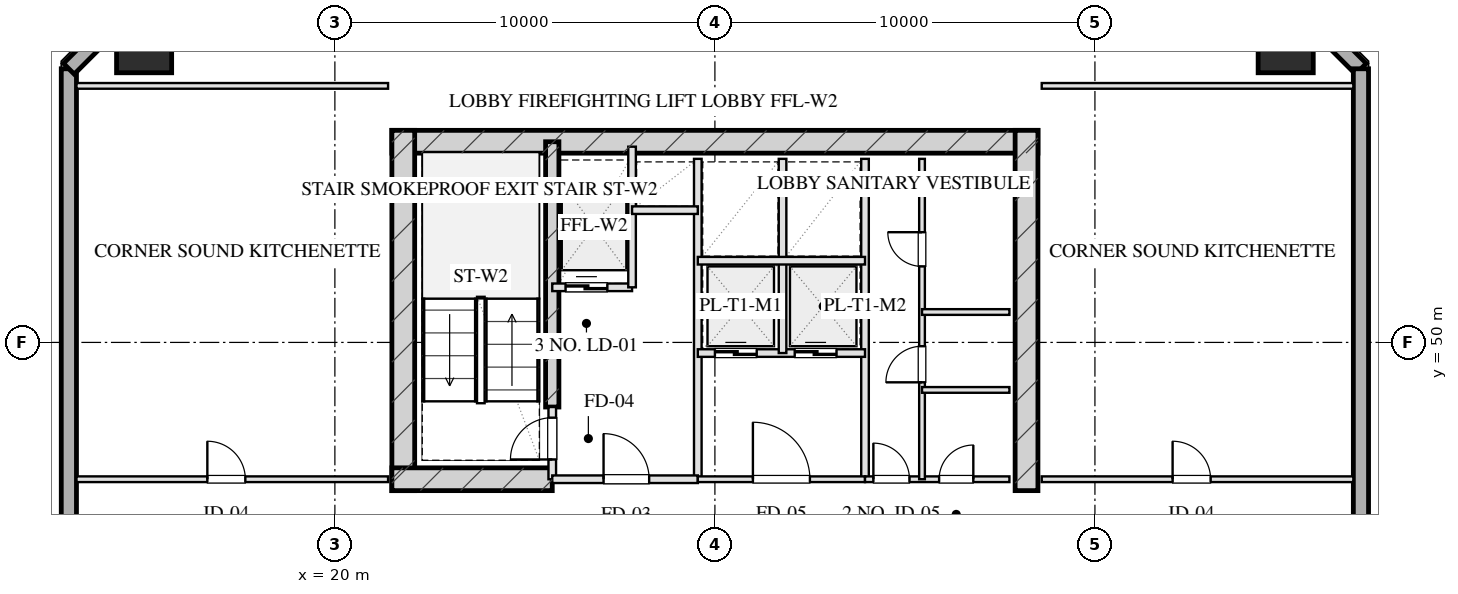
"""IFC4 building model, lengths in metres.
Left out: names, types, materials, properties, quantities, classifications, styles, units other than length and angle.
Written with IfcOpenShell. Run it as: python <this file> out.ifc"""

import sys

from ifc_helpers import new_model, si_unit, direction, frame, frame_2d, origin, origin_2d, place, context, subcontext, project, spatial, rectangle, hollow_rectangle, extrude, element, fill, save


model = new_model("IFC4")
c1 = context("Model", 3, precision=1e-05, world=origin(), true_north=direction((0.0, 1.0)))
c2 = subcontext(c1, "Body", "Model", "MODEL_VIEW")
j1 = project(units=[si_unit("LENGTHUNIT", "METRE"), si_unit("PLANEANGLEUNIT", "RADIAN")], contexts=[c1])
p1 = place(None, origin())
s1 = spatial("IfcSite", under=j1, at=p1, CompositionType="ELEMENT")
p2 = place(p1, origin())
s2 = spatial("IfcBuilding", under=s1, at=p2, CompositionType="ELEMENT")
p3 = place(p2, frame((0.0, 0.0, 180.55)))
s3 = spatial("IfcBuildingStorey", under=s2, at=p3, CompositionType="ELEMENT", Elevation=180.55)
p4 = place(p3, frame((21.5, 55.28, 0.0), z_axis=(0.0, 0.0, 1.0), x_axis=(1.0, 0.0, 0.0)))
e1 = element("IfcWall", 1, at=p4, inside=s3, PredefinedType="SHEAR", context=c2, shape_type="SweptSolid", body=[
    extrude(rectangle(XDim=17.0, YDim=0.6, at=frame_2d((8.5, 0.0))), origin(), (0.0, 0.0, 1.0), 3.45),
])
for number, where, z_axis, x_axis in (
    (2, (21.8, 46.1, 0.0), (0.0, 0.0, 1.0), (0.0, 1.0, 0.0)),
    (3, (38.2, 46.1, 0.0), (0.0, 0.0, 1.0), (0.0, 1.0, 0.0)),
):
    element("IfcWall", number, at=place(p3, frame(where, z_axis=z_axis, x_axis=x_axis)), inside=s3, PredefinedType="SHEAR", context=c2, shape_type="SweptSolid", body=[
        extrude(rectangle(XDim=9.48, YDim=0.6, at=frame_2d((4.74, 0.0))), origin(), (0.0, 0.0, 1.0), 3.45),
    ])
p5 = place(p3, frame((25.72, 48.3, 0.0), z_axis=(0.0, 0.0, 1.0), x_axis=(0.0, 1.0, 0.0)))
e4 = element("IfcWall", 4, at=p5, inside=s3, PredefinedType="SHEAR", context=c2, shape_type="SweptSolid", body=[
    extrude(rectangle(XDim=6.98, YDim=0.35, at=frame_2d((3.49, 0.0))), origin(), (0.0, 0.0, 1.0), 3.45),
])
p6 = place(p3, frame((21.5, 46.4, 0.0), z_axis=(0.0, 0.0, 1.0), x_axis=(1.0, 0.0, 0.0)))
e5 = element("IfcWall", 5, at=p6, inside=s3, PredefinedType="SHEAR", context=c2, shape_type="SweptSolid", body=[
    extrude(rectangle(XDim=4.22, YDim=0.6, at=frame_2d((2.11, 0.0))), origin(), (0.0, 0.0, 1.0), 3.45),
])
for number, where, z_axis, x_axis in (
    (6, (45.02, 57.82, 0.0), (0.0, 0.0, 1.0), (1.0, 0.0, 0.0)),
    (7, (14.98, 57.82, 0.0), (0.0, 0.0, 1.0), (1.0, 0.0, 0.0)),
):
    element("IfcColumn", number, at=place(p3, frame(where, z_axis=z_axis, x_axis=x_axis)), inside=s3, PredefinedType="COLUMN", context=c2, shape_type="SweptSolid", body=[
        extrude(hollow_rectangle(XDim=1.45, YDim=1.45, WallThickness=0.05, at=origin_2d()), origin(), (0.0, 0.0, 1.0), 3.451),
    ])
p7 = place(p3, frame((13.0, 10.8, 0.0), z_axis=(0.0, 0.0, 1.0), x_axis=(0.0, 1.0, 0.0)))
e8 = element("IfcWall", 8, at=p7, inside=s3, PredefinedType="SOLIDWALL", context=c2, shape_type="SweptSolid", body=[
    extrude(rectangle(XDim=46.4, YDim=0.4, at=frame_2d((23.2, 0.0))), origin(), (0.0, 0.0, 1.0), 2.55),
])
p8 = place(p7, frame((15.75, 0.0, 0.75)))
e9 = element("IfcOpeningElement", 9, at=p8, cuts=e8, PredefinedType="OPENING", context=c2, shape_type="SweptSolid", body=[
    extrude(rectangle(XDim=2.1, YDim=1.4, at=frame_2d((1.05, 0.7))), frame((0.0, 0.21, 0.0), z_axis=(0.0, -1.0, 0.0), x_axis=(1.0, 0.0, 0.0)), (0.0, 0.0, 1.0), 0.42),
])
p9 = place(p7, frame((19.55, 0.0, 0.75)))
e10 = element("IfcOpeningElement", 10, at=p9, cuts=e8, PredefinedType="OPENING", context=c2, shape_type="SweptSolid", body=[
    extrude(rectangle(XDim=2.1, YDim=1.4, at=frame_2d((1.05, 0.7))), frame((0.0, 0.21, 0.0), z_axis=(0.0, -1.0, 0.0), x_axis=(1.0, 0.0, 0.0)), (0.0, 0.0, 1.0), 0.42),
])
p10 = place(p7, frame((24.75, 0.0, 0.75)))
e11 = element("IfcOpeningElement", 11, at=p10, cuts=e8, PredefinedType="OPENING", context=c2, shape_type="SweptSolid", body=[
    extrude(rectangle(XDim=2.1, YDim=1.4, at=frame_2d((1.05, 0.7))), frame((0.0, 0.21, 0.0), z_axis=(0.0, -1.0, 0.0), x_axis=(1.0, 0.0, 0.0)), (0.0, 0.0, 1.0), 0.42),
])
p11 = place(p7, frame((28.55, 0.0, 0.75)))
e12 = element("IfcOpeningElement", 12, at=p11, cuts=e8, PredefinedType="OPENING", context=c2, shape_type="SweptSolid", body=[
    extrude(rectangle(XDim=2.1, YDim=1.4, at=frame_2d((1.05, 0.7))), frame((0.0, 0.21, 0.0), z_axis=(0.0, -1.0, 0.0), x_axis=(1.0, 0.0, 0.0)), (0.0, 0.0, 1.0), 0.42),
])
for number, where, z_axis, x_axis in (
    (13, (13.0, 57.2, 0.0), (0.0, 0.0, 1.0), (0.707, 0.707, 0.0)),
    (14, (44.4, 59.8, 0.0), (0.0, 0.0, 1.0), (0.707, -0.707, 0.0)),
):
    element("IfcWall", number, at=place(p3, frame(where, z_axis=z_axis, x_axis=x_axis)), inside=s3, PredefinedType="SOLIDWALL", context=c2, shape_type="SweptSolid", body=[
        extrude(rectangle(XDim=3.677, YDim=0.4, at=frame_2d((1.838, 0.0))), origin(), (0.0, 0.0, 1.0), 2.55),
    ])
p12 = place(p3, frame((47.0, 57.2, 0.0), z_axis=(0.0, 0.0, 1.0), x_axis=(0.0, -1.0, 0.0)))
e15 = element("IfcWall", 15, at=p12, inside=s3, PredefinedType="SOLIDWALL", context=c2, shape_type="SweptSolid", body=[
    extrude(rectangle(XDim=46.4, YDim=0.4, at=frame_2d((23.2, 0.0))), origin(), (0.0, 0.0, 1.0), 2.55),
])
p13 = place(p12, frame((28.55, 0.0, 0.75)))
e16 = element("IfcOpeningElement", 16, at=p13, cuts=e15, PredefinedType="OPENING", context=c2, shape_type="SweptSolid", body=[
    extrude(rectangle(XDim=2.1, YDim=1.4, at=frame_2d((1.05, 0.7))), frame((0.0, 0.21, 0.0), z_axis=(0.0, -1.0, 0.0), x_axis=(1.0, 0.0, 0.0)), (0.0, 0.0, 1.0), 0.42),
])
p14 = place(p12, frame((24.75, 0.0, 0.75)))
e17 = element("IfcOpeningElement", 17, at=p14, cuts=e15, PredefinedType="OPENING", context=c2, shape_type="SweptSolid", body=[
    extrude(rectangle(XDim=2.1, YDim=1.4, at=frame_2d((1.05, 0.7))), frame((0.0, 0.21, 0.0), z_axis=(0.0, -1.0, 0.0), x_axis=(1.0, 0.0, 0.0)), (0.0, 0.0, 1.0), 0.42),
])
p15 = place(p12, frame((19.55, 0.0, 0.75)))
e18 = element("IfcOpeningElement", 18, at=p15, cuts=e15, PredefinedType="OPENING", context=c2, shape_type="SweptSolid", body=[
    extrude(rectangle(XDim=2.1, YDim=1.4, at=frame_2d((1.05, 0.7))), frame((0.0, 0.21, 0.0), z_axis=(0.0, -1.0, 0.0), x_axis=(1.0, 0.0, 0.0)), (0.0, 0.0, 1.0), 0.42),
])
p16 = place(p12, frame((15.75, 0.0, 0.75)))
e19 = element("IfcOpeningElement", 19, at=p16, cuts=e15, PredefinedType="OPENING", context=c2, shape_type="SweptSolid", body=[
    extrude(rectangle(XDim=2.1, YDim=1.4, at=frame_2d((1.05, 0.7))), frame((0.0, 0.21, 0.0), z_axis=(0.0, -1.0, 0.0), x_axis=(1.0, 0.0, 0.0)), (0.0, 0.0, 1.0), 0.42),
])
p17 = place(p3, frame((25.72, 46.4, 0.0), z_axis=(0.0, 0.0, 1.0), x_axis=(0.0, 1.0, 0.0)))
e20 = element("IfcWall", 20, at=p17, inside=s3, PredefinedType="PARTITIONING", context=c2, shape_type="SweptSolid", body=[
    extrude(rectangle(XDim=1.9, YDim=0.2, at=frame_2d((0.95, 0.0))), origin(), (0.0, 0.0, 1.0), 3.155),
])
p18 = place(p17, frame((0.52, 0.0, 0.0)))
e21 = element("IfcOpeningElement", 21, at=p18, cuts=e20, PredefinedType="OPENING", context=c2, shape_type="SweptSolid", body=[
    extrude(rectangle(XDim=1.1, YDim=2.05, at=frame_2d((0.55, 1.025))), frame((0.0, 0.11, 0.0), z_axis=(0.0, -1.0, 0.0), x_axis=(1.0, 0.0, 0.0)), (0.0, 0.0, 1.0), 0.22),
])
p19 = place(p3, frame((29.55, 46.4, 0.0), z_axis=(0.0, 0.0, 1.0), x_axis=(0.0, 1.0, 0.0)))
e22 = element("IfcWall", 22, at=p19, inside=s3, PredefinedType="PARTITIONING", context=c2, shape_type="SweptSolid", body=[
    extrude(rectangle(XDim=8.43, YDim=0.2, at=frame_2d((4.215, 0.0))), origin(), (0.0, 0.0, 1.0), 3.155),
])
p20 = place(p3, frame((25.72, 46.4, 0.0), z_axis=(0.0, 0.0, 1.0), x_axis=(1.0, 0.0, 0.0)))
e23 = element("IfcWall", 23, at=p20, inside=s3, PredefinedType="PARTITIONING", context=c2, shape_type="SweptSolid", body=[
    extrude(rectangle(XDim=3.83, YDim=0.2, at=frame_2d((1.915, 0.0))), origin(), (0.0, 0.0, 1.0), 3.155),
])
p21 = place(p20, frame((1.35, 0.0, 0.0)))
e24 = element("IfcOpeningElement", 24, at=p21, cuts=e23, PredefinedType="OPENING", context=c2, shape_type="SweptSolid", body=[
    extrude(rectangle(XDim=1.2, YDim=2.05, at=frame_2d((0.6, 1.025))), frame((0.0, 0.11, 0.0), z_axis=(0.0, -1.0, 0.0), x_axis=(1.0, 0.0, 0.0)), (0.0, 0.0, 1.0), 0.22),
])
p22 = place(p3, frame((25.72, 51.45, 0.0), z_axis=(0.0, 0.0, 1.0), x_axis=(1.0, 0.0, 0.0)))
e25 = element("IfcWall", 25, at=p22, inside=s3, PredefinedType="PARTITIONING", context=c2, shape_type="SweptSolid", body=[
    extrude(rectangle(XDim=2.1, YDim=0.2, at=frame_2d((1.05, 0.0))), origin(), (0.0, 0.0, 1.0), 3.155),
])
p23 = place(p22, frame((0.35, 0.0, 0.0)))
e26 = element("IfcOpeningElement", 26, at=p23, cuts=e25, PredefinedType="OPENING", context=c2, shape_type="SweptSolid", body=[
    extrude(rectangle(XDim=1.1, YDim=2.05, at=frame_2d((0.55, 1.025))), frame((0.0, 0.11, 0.0), z_axis=(0.0, -1.0, 0.0), x_axis=(1.0, 0.0, 0.0)), (0.0, 0.0, 1.0), 0.22),
])
p24 = place(p3, frame((27.82, 51.45, 0.0), z_axis=(0.0, 0.0, 1.0), x_axis=(0.0, 1.0, 0.0)))
e27 = element("IfcWall", 27, at=p24, inside=s3, PredefinedType="PARTITIONING", context=c2, shape_type="SweptSolid", body=[
    extrude(rectangle(XDim=3.7, YDim=0.2, at=frame_2d((1.85, 0.0))), origin(), (0.0, 0.0, 1.0), 3.155),
])
p25 = place(p3, frame((27.82, 53.48, 0.0), z_axis=(0.0, 0.0, 1.0), x_axis=(1.0, 0.0, 0.0)))
e28 = element("IfcWall", 28, at=p25, inside=s3, PredefinedType="PARTITIONING", context=c2, shape_type="SweptSolid", body=[
    extrude(rectangle(XDim=1.73, YDim=0.2, at=frame_2d((0.865, 0.0))), origin(), (0.0, 0.0, 1.0), 3.155),
])
p26 = place(p3, frame((33.95, 46.4, 0.0), z_axis=(0.0, 0.0, 1.0), x_axis=(0.0, 1.0, 0.0)))
e29 = element("IfcWall", 29, at=p26, inside=s3, PredefinedType="PARTITIONING", context=c2, shape_type="SweptSolid", body=[
    extrude(rectangle(XDim=8.43, YDim=0.2, at=frame_2d((4.215, 0.0))), origin(), (0.0, 0.0, 1.0), 3.155),
])
p27 = place(p3, frame((29.55, 46.4, 0.0), z_axis=(0.0, 0.0, 1.0), x_axis=(1.0, 0.0, 0.0)))
e30 = element("IfcWall", 30, at=p27, inside=s3, PredefinedType="PARTITIONING", context=c2, shape_type="SweptSolid", body=[
    extrude(rectangle(XDim=4.4, YDim=0.15, at=frame_2d((2.2, 0.0))), origin(), (0.0, 0.0, 1.0), 3.155),
])
p28 = place(p27, frame((1.45, 0.0, 0.0)))
e31 = element("IfcOpeningElement", 31, at=p28, cuts=e30, PredefinedType="OPENING", context=c2, shape_type="SweptSolid", body=[
    extrude(rectangle(XDim=1.5, YDim=2.05, at=frame_2d((0.75, 1.025))), frame((0.0, 0.085, 0.0), z_axis=(0.0, -1.0, 0.0), x_axis=(1.0, 0.0, 0.0)), (0.0, 0.0, 1.0), 0.17),
])
p29 = place(p3, frame((29.55, 49.72, 0.0), z_axis=(0.0, 0.0, 1.0), x_axis=(1.0, 0.0, 0.0)))
e32 = element("IfcWall", 32, at=p29, inside=s3, PredefinedType="PARTITIONING", context=c2, shape_type="SweptSolid", body=[
    extrude(rectangle(XDim=4.4, YDim=0.2, at=frame_2d((2.2, 0.0))), origin(), (0.0, 0.0, 1.0), 3.155),
])
p30 = place(p29, frame((0.45, 0.0, 0.0)))
e33 = element("IfcOpeningElement", 33, at=p30, cuts=e32, PredefinedType="OPENING", context=c2, shape_type="SweptSolid", body=[
    extrude(rectangle(XDim=1.1, YDim=2.05, at=frame_2d((0.55, 1.025))), frame((0.0, 0.11, 0.0), z_axis=(0.0, -1.0, 0.0), x_axis=(1.0, 0.0, 0.0)), (0.0, 0.0, 1.0), 0.22),
])
p31 = place(p29, frame((2.55, 0.0, 0.0)))
e34 = element("IfcOpeningElement", 34, at=p31, cuts=e32, PredefinedType="OPENING", context=c2, shape_type="SweptSolid", body=[
    extrude(rectangle(XDim=1.1, YDim=2.05, at=frame_2d((0.55, 1.025))), frame((0.0, 0.11, 0.0), z_axis=(0.0, -1.0, 0.0), x_axis=(1.0, 0.0, 0.0)), (0.0, 0.0, 1.0), 0.22),
])
p32 = place(p3, frame((31.78, 49.72, 0.0), z_axis=(0.0, 0.0, 1.0), x_axis=(0.0, 1.0, 0.0)))
e35 = element("IfcWall", 35, at=p32, inside=s3, PredefinedType="PARTITIONING", context=c2, shape_type="SweptSolid", body=[
    extrude(rectangle(XDim=5.11, YDim=0.2, at=frame_2d((2.555, 0.0))), origin(), (0.0, 0.0, 1.0), 3.155),
])
p33 = place(p3, frame((29.55, 52.15, 0.0), z_axis=(0.0, 0.0, 1.0), x_axis=(1.0, 0.0, 0.0)))
e36 = element("IfcWall", 36, at=p33, inside=s3, PredefinedType="PARTITIONING", context=c2, shape_type="SweptSolid", body=[
    extrude(rectangle(XDim=4.4, YDim=0.2, at=frame_2d((2.2, 0.0))), origin(), (0.0, 0.0, 1.0), 3.155),
])
p34 = place(p3, frame((33.95, 46.4, 0.0), z_axis=(0.0, 0.0, 1.0), x_axis=(1.0, 0.0, 0.0)))
e37 = element("IfcWall", 37, at=p34, inside=s3, PredefinedType="PARTITIONING", context=c2, shape_type="SweptSolid", body=[
    extrude(rectangle(XDim=3.8, YDim=0.15, at=frame_2d((1.9, 0.0))), origin(), (0.0, 0.0, 1.0), 3.155),
])
p35 = place(p34, frame((0.22, 0.0, 0.0)))
e38 = element("IfcOpeningElement", 38, at=p35, cuts=e37, PredefinedType="OPENING", context=c2, shape_type="SweptSolid", body=[
    extrude(rectangle(XDim=0.95, YDim=2.05, at=frame_2d((0.475, 1.025))), frame((0.0, 0.085, 0.0), z_axis=(0.0, -1.0, 0.0), x_axis=(1.0, 0.0, 0.0)), (0.0, 0.0, 1.0), 0.17),
])
p36 = place(p34, frame((1.95, 0.0, 0.0)))
e39 = element("IfcOpeningElement", 39, at=p36, cuts=e37, PredefinedType="OPENING", context=c2, shape_type="SweptSolid", body=[
    extrude(rectangle(XDim=0.9, YDim=2.05, at=frame_2d((0.45, 1.025))), frame((0.0, 0.085, 0.0), z_axis=(0.0, -1.0, 0.0), x_axis=(1.0, 0.0, 0.0)), (0.0, 0.0, 1.0), 0.17),
])
p37 = place(p3, frame((35.45, 46.4, 0.0), z_axis=(0.0, 0.0, 1.0), x_axis=(0.0, 1.0, 0.0)))
e40 = element("IfcWall", 40, at=p37, inside=s3, PredefinedType="PARTITIONING", context=c2, shape_type="SweptSolid", body=[
    extrude(rectangle(XDim=8.43, YDim=0.15, at=frame_2d((4.215, 0.0))), origin(), (0.0, 0.0, 1.0), 2.745),
])
p38 = place(p37, frame((2.55, 0.0, 0.0)))
e41 = element("IfcOpeningElement", 41, at=p38, cuts=e40, PredefinedType="OPENING", context=c2, shape_type="SweptSolid", body=[
    extrude(rectangle(XDim=0.95, YDim=2.05, at=frame_2d((0.475, 1.025))), frame((0.0, 0.085, 0.0), z_axis=(0.0, -1.0, 0.0), x_axis=(1.0, 0.0, 0.0)), (0.0, 0.0, 1.0), 0.17),
])
p39 = place(p37, frame((5.6, 0.0, 0.0)))
e42 = element("IfcOpeningElement", 42, at=p39, cuts=e40, PredefinedType="OPENING", context=c2, shape_type="SweptSolid", body=[
    extrude(rectangle(XDim=0.9, YDim=2.05, at=frame_2d((0.45, 1.025))), frame((0.0, 0.085, 0.0), z_axis=(0.0, -1.0, 0.0), x_axis=(1.0, 0.0, 0.0)), (0.0, 0.0, 1.0), 0.17),
])
for number, where, z_axis, x_axis in (
    (43, (35.45, 50.8, 0.0), (0.0, 0.0, 1.0), (1.0, 0.0, 0.0)),
    (44, (35.45, 48.75, 0.0), (0.0, 0.0, 1.0), (1.0, 0.0, 0.0)),
):
    element("IfcWall", number, at=place(p3, frame(where, z_axis=z_axis, x_axis=x_axis)), inside=s3, PredefinedType="PARTITIONING", context=c2, shape_type="SweptSolid", body=[
        extrude(rectangle(XDim=2.3, YDim=0.15, at=frame_2d((1.15, 0.0))), origin(), (0.0, 0.0, 1.0), 3.155),
    ])
p40 = place(p3, frame((13.2, 56.75, 0.0), z_axis=(0.0, 0.0, 1.0), x_axis=(1.0, 0.0, 0.0)))
e45 = element("IfcWall", 45, at=p40, inside=s3, PredefinedType="PARTITIONING", context=c2, shape_type="SweptSolid", body=[
    extrude(rectangle(XDim=8.2, YDim=0.15, at=frame_2d((4.1, 0.0))), origin(), (0.0, 0.0, 1.0), 3.155),
])
p41 = place(p3, frame((13.2, 46.4, 0.0), z_axis=(0.0, 0.0, 1.0), x_axis=(1.0, 0.0, 0.0)))
e46 = element("IfcWall", 46, at=p41, inside=s3, PredefinedType="PARTITIONING", context=c2, shape_type="SweptSolid", body=[
    extrude(rectangle(XDim=8.2, YDim=0.15, at=frame_2d((4.1, 0.0))), origin(), (0.0, 0.0, 1.0), 3.155),
])
p42 = place(p41, frame((3.444, 0.0, 0.0)))
e47 = element("IfcOpeningElement", 47, at=p42, cuts=e46, PredefinedType="OPENING", context=c2, shape_type="SweptSolid", body=[
    extrude(rectangle(XDim=1.0, YDim=2.05, at=frame_2d((0.5, 1.025))), frame((0.0, 0.085, 0.0), z_axis=(0.0, -1.0, 0.0), x_axis=(1.0, 0.0, 0.0)), (0.0, 0.0, 1.0), 0.17),
])
p43 = place(p3, frame((38.6, 56.75, 0.0), z_axis=(0.0, 0.0, 1.0), x_axis=(1.0, 0.0, 0.0)))
e48 = element("IfcWall", 48, at=p43, inside=s3, PredefinedType="PARTITIONING", context=c2, shape_type="SweptSolid", body=[
    extrude(rectangle(XDim=8.2, YDim=0.15, at=frame_2d((4.1, 0.0))), origin(), (0.0, 0.0, 1.0), 3.155),
])
p44 = place(p3, frame((38.6, 46.4, 0.0), z_axis=(0.0, 0.0, 1.0), x_axis=(1.0, 0.0, 0.0)))
e49 = element("IfcWall", 49, at=p44, inside=s3, PredefinedType="PARTITIONING", context=c2, shape_type="SweptSolid", body=[
    extrude(rectangle(XDim=8.2, YDim=0.15, at=frame_2d((4.1, 0.0))), origin(), (0.0, 0.0, 1.0), 3.155),
])
p45 = place(p44, frame((3.444, 0.0, 0.0)))
e50 = element("IfcOpeningElement", 50, at=p45, cuts=e49, PredefinedType="OPENING", context=c2, shape_type="SweptSolid", body=[
    extrude(rectangle(XDim=1.0, YDim=2.05, at=frame_2d((0.5, 1.025))), frame((0.0, 0.085, 0.0), z_axis=(0.0, -1.0, 0.0), x_axis=(1.0, 0.0, 0.0)), (0.0, 0.0, 1.0), 0.17),
])
p46 = place(p18, origin())
e51 = element("IfcDoor", 51, at=p46, inside=s3, OperationType="SINGLE_SWING_LEFT", PredefinedType="DOOR", context=c2, shape_type="SweptSolid", body=[
    extrude(rectangle(XDim=1.1, YDim=2.05, at=frame_2d((0.55, 1.025))), frame((0.0, 0.025, 0.0), z_axis=(0.0, -1.0, 0.0), x_axis=(1.0, 0.0, 0.0)), (0.0, 0.0, 1.0), 0.05),
])
fill(e21, e51)
p47 = place(p21, origin())
e52 = element("IfcDoor", 52, at=p47, inside=s3, OperationType="SINGLE_SWING_LEFT", PredefinedType="DOOR", context=c2, shape_type="SweptSolid", body=[
    extrude(rectangle(XDim=1.2, YDim=2.05, at=frame_2d((0.6, 1.025))), frame((0.0, 0.025, 0.0), z_axis=(0.0, -1.0, 0.0), x_axis=(1.0, 0.0, 0.0)), (0.0, 0.0, 1.0), 0.05),
])
fill(e24, e52)
p48 = place(p23, origin())
e53 = element("IfcDoor", 53, at=p48, inside=s3, OperationType="DOUBLE_DOOR_SLIDING", PredefinedType="DOOR", context=c2, shape_type="SweptSolid", body=[
    extrude(rectangle(XDim=1.1, YDim=2.05, at=frame_2d((0.55, 1.025))), frame((0.0, 0.025, 0.0), z_axis=(0.0, -1.0, 0.0), x_axis=(1.0, 0.0, 0.0)), (0.0, 0.0, 1.0), 0.05),
])
fill(e26, e53)
p49 = place(p28, origin())
e54 = element("IfcDoor", 54, at=p49, inside=s3, OperationType="SINGLE_SWING_LEFT", PredefinedType="DOOR", context=c2, shape_type="SweptSolid", body=[
    extrude(rectangle(XDim=1.5, YDim=2.05, at=frame_2d((0.75, 1.025))), frame((0.0, 0.025, 0.0), z_axis=(0.0, -1.0, 0.0), x_axis=(1.0, 0.0, 0.0)), (0.0, 0.0, 1.0), 0.05),
])
fill(e31, e54)
p50 = place(p30, origin())
e55 = element("IfcDoor", 55, at=p50, inside=s3, OperationType="DOUBLE_DOOR_SLIDING", PredefinedType="DOOR", context=c2, shape_type="SweptSolid", body=[
    extrude(rectangle(XDim=1.1, YDim=2.05, at=frame_2d((0.55, 1.025))), frame((0.0, 0.025, 0.0), z_axis=(0.0, -1.0, 0.0), x_axis=(1.0, 0.0, 0.0)), (0.0, 0.0, 1.0), 0.05),
])
fill(e33, e55)
p51 = place(p31, origin())
e56 = element("IfcDoor", 56, at=p51, inside=s3, OperationType="DOUBLE_DOOR_SLIDING", PredefinedType="DOOR", context=c2, shape_type="SweptSolid", body=[
    extrude(rectangle(XDim=1.1, YDim=2.05, at=frame_2d((0.55, 1.025))), frame((0.0, 0.025, 0.0), z_axis=(0.0, -1.0, 0.0), x_axis=(1.0, 0.0, 0.0)), (0.0, 0.0, 1.0), 0.05),
])
fill(e34, e56)
p52 = place(p35, origin())
e57 = element("IfcDoor", 57, at=p52, inside=s3, OperationType="SINGLE_SWING_LEFT", PredefinedType="DOOR", context=c2, shape_type="SweptSolid", body=[
    extrude(rectangle(XDim=0.95, YDim=2.05, at=frame_2d((0.475, 1.025))), frame((0.0, 0.025, 0.0), z_axis=(0.0, -1.0, 0.0), x_axis=(1.0, 0.0, 0.0)), (0.0, 0.0, 1.0), 0.05),
])
fill(e38, e57)
p53 = place(p36, origin())
e58 = element("IfcDoor", 58, at=p53, inside=s3, OperationType="SINGLE_SWING_RIGHT", PredefinedType="DOOR", context=c2, shape_type="SweptSolid", body=[
    extrude(rectangle(XDim=0.9, YDim=2.05, at=frame_2d((0.45, 1.025))), frame((0.0, 0.025, 0.0), z_axis=(0.0, -1.0, 0.0), x_axis=(1.0, 0.0, 0.0)), (0.0, 0.0, 1.0), 0.05),
])
fill(e39, e58)
p54 = place(p38, origin())
e59 = element("IfcDoor", 59, at=p54, inside=s3, OperationType="SINGLE_SWING_LEFT", PredefinedType="DOOR", context=c2, shape_type="SweptSolid", body=[
    extrude(rectangle(XDim=0.95, YDim=2.05, at=frame_2d((0.475, 1.025))), frame((0.0, 0.025, 0.0), z_axis=(0.0, -1.0, 0.0), x_axis=(1.0, 0.0, 0.0)), (0.0, 0.0, 1.0), 0.05),
])
fill(e41, e59)
p55 = place(p39, origin())
e60 = element("IfcDoor", 60, at=p55, inside=s3, OperationType="SINGLE_SWING_RIGHT", PredefinedType="DOOR", context=c2, shape_type="SweptSolid", body=[
    extrude(rectangle(XDim=0.9, YDim=2.05, at=frame_2d((0.45, 1.025))), frame((0.0, 0.025, 0.0), z_axis=(0.0, -1.0, 0.0), x_axis=(1.0, 0.0, 0.0)), (0.0, 0.0, 1.0), 0.05),
])
fill(e42, e60)
p56 = place(p42, origin())
e61 = element("IfcDoor", 61, at=p56, inside=s3, OperationType="SINGLE_SWING_LEFT", PredefinedType="DOOR", context=c2, shape_type="SweptSolid", body=[
    extrude(rectangle(XDim=1.0, YDim=2.05, at=frame_2d((0.5, 1.025))), frame((0.0, 0.025, 0.0), z_axis=(0.0, -1.0, 0.0), x_axis=(1.0, 0.0, 0.0)), (0.0, 0.0, 1.0), 0.05),
])
fill(e47, e61)
p57 = place(p45, origin())
e62 = element("IfcDoor", 62, at=p57, inside=s3, OperationType="SINGLE_SWING_LEFT", PredefinedType="DOOR", context=c2, shape_type="SweptSolid", body=[
    extrude(rectangle(XDim=1.0, YDim=2.05, at=frame_2d((0.5, 1.025))), frame((0.0, 0.025, 0.0), z_axis=(0.0, -1.0, 0.0), x_axis=(1.0, 0.0, 0.0)), (0.0, 0.0, 1.0), 0.05),
])
fill(e50, e62)
save(model, sys.argv[1])
